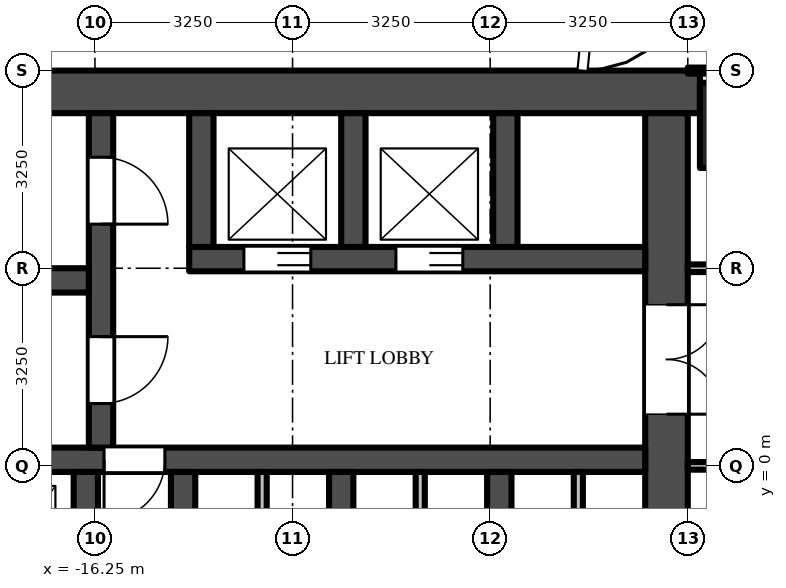
"""IFC4 building model, lengths in metres.
Left out: names, types, materials, properties, quantities, classifications, styles, units other than length and angle.
Written with IfcOpenShell. Run it as: python <this file> out.ifc"""

import sys

from ifc_helpers import new_model, si_unit, direction, frame, frame_2d, origin, origin_2d, place, context, subcontext, project, spatial, rectangle, extrude, source, transform, mapped, element, fill, save


model = new_model("IFC4")
c1 = context("Model", 3, precision=1e-05, world=origin(), true_north=direction((0.0, 1.0)))
c2 = subcontext(c1, "Body", "Model", "MODEL_VIEW")
j1 = project(units=[si_unit("LENGTHUNIT", "METRE"), si_unit("PLANEANGLEUNIT", "RADIAN")], contexts=[c1])
p1 = place(None, origin())
s1 = spatial("IfcSite", under=j1, at=p1, CompositionType="ELEMENT")
p2 = place(p1, origin())
s2 = spatial("IfcBuilding", under=s1, at=p2, CompositionType="ELEMENT")
p3 = place(p2, frame((0.0, 0.0, 83.5)))
s3 = spatial("IfcBuildingStorey", under=s2, at=p3, CompositionType="ELEMENT", Elevation=83.5)
m1 = source(origin(), c2, "Body", "SweptSolid", [
    extrude(rectangle(XDim=1.4, YDim=1.4, at=origin_2d()), origin(), (0.0, 0.0, 1.0), 4.5),
])
p4 = place(p3, frame((-5.6, 5.6, 0.0), z_axis=(0.0, 0.0, 1.0), x_axis=(1.0, 0.0, 0.0)))
e1 = element("IfcColumn", 1, at=p4, inside=s3, PredefinedType="COLUMN", context=c2, shape_type="MappedRepresentation", body=[
    mapped(m1, transform((0.0, 0.0, 0.0))),
])
m2 = source(origin(), c2, "Body", "SweptSolid", [
    extrude(rectangle(XDim=16.45, YDim=0.7, at=frame_2d((8.225, 0.0))), origin(), (0.0, 0.0, 1.0), 4.25),
])
p5 = place(p3, frame((-6.3, 6.15, 0.0), z_axis=(0.0, 0.0, 1.0), x_axis=(-1.0, 0.0, 0.0)))
e2 = element("IfcWall", 2, at=p5, inside=s3, PredefinedType="SHEAR", context=c2, shape_type="MappedRepresentation", body=[
    mapped(m2, transform((0.0, 0.0, 0.0))),
])
m3 = source(origin(), c2, "Body", "SweptSolid", [
    extrude(rectangle(XDim=9.05, YDim=0.7, at=frame_2d((4.525, 0.0))), origin(), (0.0, 0.0, 1.0), 4.25),
])
p6 = place(p3, frame((-6.85, 5.8, 0.0), z_axis=(0.0, 0.0, 1.0), x_axis=(0.0, -1.0, 0.0)))
e3 = element("IfcWall", 3, at=p6, inside=s3, PredefinedType="SHEAR", context=c2, shape_type="MappedRepresentation", body=[
    mapped(m3, transform((0.0, 0.0, 0.0))),
])
m4 = source(origin(), c2, "Body", "SweptSolid", [
    extrude(rectangle(XDim=1.8, YDim=2.1, at=frame_2d((0.9, 1.05))), frame((0.0, 0.36, 0.0), z_axis=(0.0, -1.0, 0.0), x_axis=(1.0, 0.0, 0.0)), (0.0, 0.0, 1.0), 0.72),
])
p7 = place(p6, frame((3.15, 0.0, 0.0)))
e4 = element("IfcOpeningElement", 4, at=p7, cuts=e3, PredefinedType="OPENING", context=c2, shape_type="MappedRepresentation", body=[
    mapped(m4, transform((0.0, 0.0, 0.0))),
])
m5 = source(origin(), c2, "Body", "SweptSolid", [
    extrude(rectangle(XDim=7.5, YDim=0.4, at=frame_2d((3.75, 0.0))), origin(), (0.0, 0.0, 1.0), 4.25),
])
p8 = place(p3, frame((-7.2, 3.4, 0.0), z_axis=(0.0, 0.0, 1.0), x_axis=(-1.0, 0.0, 0.0)))
e5 = element("IfcWall", 5, at=p8, inside=s3, PredefinedType="SHEAR", context=c2, shape_type="MappedRepresentation", body=[
    mapped(m5, transform((0.0, 0.0, 0.0))),
])
m6 = source(origin(), c2, "Body", "SweptSolid", [
    extrude(rectangle(XDim=1.1, YDim=2.1, at=frame_2d((0.55, 1.05))), frame((0.0, 0.21, 0.0), z_axis=(0.0, -1.0, 0.0), x_axis=(1.0, 0.0, 0.0)), (0.0, 0.0, 1.0), 0.42),
])
p9 = place(p8, frame((3.0, 0.0, 0.0)))
e6 = element("IfcOpeningElement", 6, at=p9, cuts=e5, PredefinedType="OPENING", context=c2, shape_type="MappedRepresentation", body=[
    mapped(m6, transform((0.0, 0.0, 0.0))),
])
p10 = place(p8, frame((5.5, 0.0, 0.0)))
e7 = element("IfcOpeningElement", 7, at=p10, cuts=e5, PredefinedType="OPENING", context=c2, shape_type="MappedRepresentation", body=[
    mapped(m6, transform((0.0, 0.0, 0.0))),
])
m7 = source(origin(), c2, "Body", "SweptSolid", [
    extrude(rectangle(XDim=14.85, YDim=0.4, at=frame_2d((7.425, 0.0))), origin(), (0.0, 0.0, 1.0), 4.25),
])
p11 = place(p3, frame((-7.2, 0.1, 0.0), z_axis=(0.0, 0.0, 1.0), x_axis=(-1.0, 0.0, 0.0)))
e8 = element("IfcWall", 8, at=p11, inside=s3, PredefinedType="SHEAR", context=c2, shape_type="MappedRepresentation", body=[
    mapped(m7, transform((0.0, 0.0, 0.0))),
])
m8 = source(origin(), c2, "Body", "SweptSolid", [
    extrude(rectangle(XDim=1.0, YDim=2.1, at=frame_2d((0.5, 1.05))), frame((0.0, 0.21, 0.0), z_axis=(0.0, -1.0, 0.0), x_axis=(1.0, 0.0, 0.0)), (0.0, 0.0, 1.0), 0.42),
])
p12 = place(p11, frame((7.9, 0.0, 0.0)))
e9 = element("IfcOpeningElement", 9, at=p12, cuts=e8, PredefinedType="OPENING", context=c2, shape_type="MappedRepresentation", body=[
    mapped(m8, transform((0.0, 0.0, 0.0))),
])
m9 = source(origin(), c2, "Body", "SweptSolid", [
    extrude(rectangle(XDim=5.5, YDim=0.4, at=frame_2d((2.75, 0.0))), origin(), (0.0, 0.0, 1.0), 4.25),
])
p13 = place(p3, frame((-16.15, 5.8, 0.0), z_axis=(0.0, 0.0, 1.0), x_axis=(0.0, -1.0, 0.0)))
e10 = element("IfcWall", 10, at=p13, inside=s3, PredefinedType="SHEAR", context=c2, shape_type="MappedRepresentation", body=[
    mapped(m9, transform((0.0, 0.0, 0.0))),
])
p14 = place(p13, frame((0.725, 0.0, 0.0)))
e11 = element("IfcOpeningElement", 11, at=p14, cuts=e10, PredefinedType="OPENING", context=c2, shape_type="MappedRepresentation", body=[
    mapped(m6, transform((0.0, 0.0, 0.0))),
])
p15 = place(p13, frame((3.675, 0.0, 0.0)))
e12 = element("IfcOpeningElement", 12, at=p15, cuts=e10, PredefinedType="OPENING", context=c2, shape_type="MappedRepresentation", body=[
    mapped(m6, transform((0.0, 0.0, 0.0))),
])
m10 = source(origin(), c2, "Body", "SweptSolid", [
    extrude(rectangle(XDim=5.7, YDim=0.4, at=frame_2d((2.85, 0.0))), origin(), (0.0, 0.0, 1.0), 4.25),
])
p16 = place(p3, frame((-16.35, 3.05, 0.0), z_axis=(0.0, 0.0, 1.0), x_axis=(-1.0, 0.0, 0.0)))
e13 = element("IfcWall", 13, at=p16, inside=s3, PredefinedType="SHEAR", context=c2, shape_type="MappedRepresentation", body=[
    mapped(m10, transform((0.0, 0.0, 0.0))),
])
m11 = source(origin(), c2, "Body", "SweptSolid", [
    extrude(rectangle(XDim=2.2, YDim=0.4, at=frame_2d((1.1, 0.0))), origin(), (0.0, 0.0, 1.0), 4.25),
])
for number, where, z_axis, x_axis in (
    (14, (-9.5, 5.8, 0.0), (0.0, 0.0, 1.0), (0.0, -1.0, 0.0)),
    (15, (-12.0, 5.8, 0.0), (0.0, 0.0, 1.0), (0.0, -1.0, 0.0)),
    (16, (-14.5, 5.8, 0.0), (0.0, 0.0, 1.0), (0.0, -1.0, 0.0)),
):
    element("IfcWall", number, at=place(p3, frame(where, z_axis=z_axis, x_axis=x_axis)), inside=s3, PredefinedType="SHEAR", context=c2, shape_type="MappedRepresentation", body=[
        mapped(m11, transform((0.0, 0.0, 0.0))),
    ])
m12 = source(origin(), c2, "Body", "SweptSolid", [
    extrude(rectangle(XDim=2.45, YDim=0.4, at=frame_2d((1.225, 0.0))), origin(), (0.0, 0.0, 1.0), 4.25),
])
for number, where, z_axis, x_axis in (
    (17, (-9.6, -0.1, 0.0), (0.0, 0.0, 1.0), (0.0, -1.0, 0.0)),
    (18, (-12.2, -0.1, 0.0), (0.0, 0.0, 1.0), (0.0, -1.0, 0.0)),
    (19, (-14.8, -0.1, 0.0), (0.0, 0.0, 1.0), (0.0, -1.0, 0.0)),
    (20, (-16.4, -0.1, 0.0), (0.0, 0.0, 1.0), (0.0, -1.0, 0.0)),
):
    element("IfcWall", number, at=place(p3, frame(where, z_axis=z_axis, x_axis=x_axis)), inside=s3, PredefinedType="SHEAR", context=c2, shape_type="MappedRepresentation", body=[
        mapped(m12, transform((0.0, 0.0, 0.0))),
    ])
m13 = source(origin(), c2, "Body", "SweptSolid", [
    extrude(rectangle(XDim=2.45, YDim=0.15, at=frame_2d((1.225, 0.0))), origin(), (0.0, 0.0, 1.0), 4.25),
])
for number, where, z_axis, x_axis in (
    (21, (-8.3, -0.1, 0.0), (0.0, 0.0, 1.0), (0.0, -1.0, 0.0)),
    (22, (-10.9, -0.1, 0.0), (0.0, 0.0, 1.0), (0.0, -1.0, 0.0)),
    (23, (-13.5, -0.1, 0.0), (0.0, 0.0, 1.0), (0.0, -1.0, 0.0)),
):
    element("IfcWall", number, at=place(p3, frame(where, z_axis=z_axis, x_axis=x_axis)), inside=s3, PredefinedType="PARTITIONING", context=c2, shape_type="MappedRepresentation", body=[
        mapped(m13, transform((0.0, 0.0, 0.0))),
    ])
m14 = source(origin(), c2, "Body", "SweptSolid", [
    extrude(rectangle(XDim=5.363, YDim=0.125, at=frame_2d((2.681, 0.0))), origin(), (0.0, 0.0, 1.0), 3.468),
])
p17 = place(p3, frame((-1.137, 0.0, 0.0), z_axis=(0.0, 0.0, 1.0), x_axis=(-1.0, 0.0, 0.0)))
e24 = element("IfcWall", 24, at=p17, inside=s3, PredefinedType="PARTITIONING", context=c2, shape_type="MappedRepresentation", body=[
    mapped(m14, transform((0.0, 0.0, 0.0))),
])
p18 = place(p3, frame((-6.5, 3.25, 0.0), z_axis=(0.0, 0.0, 1.0), x_axis=(1.0, 0.0, 0.0)))
e25 = element("IfcWall", 25, at=p18, inside=s3, PredefinedType="PARTITIONING", context=c2, shape_type="MappedRepresentation", body=[
    mapped(m14, transform((0.0, 0.0, 0.0))),
])
m15 = source(origin(), c2, "Body", "SweptSolid", [
    extrude(rectangle(XDim=1.0, YDim=2.1, at=frame_2d((0.5, 1.05))), frame((0.0, 0.073, 0.0), z_axis=(0.0, -1.0, 0.0), x_axis=(1.0, 0.0, 0.0)), (0.0, 0.0, 1.0), 0.145),
])
p19 = place(p18, frame((1.3, 0.0, 0.0)))
e26 = element("IfcOpeningElement", 26, at=p19, cuts=e25, PredefinedType="OPENING", context=c2, shape_type="MappedRepresentation", body=[
    mapped(m15, transform((0.0, 0.0, 0.0))),
])
m16 = source(origin(), c2, "Body", "SweptSolid", [
    extrude(rectangle(XDim=5.238, YDim=0.1, at=frame_2d((2.619, 0.0))), origin(), (0.0, 0.0, 1.0), 3.33),
])
p20 = place(p3, frame((-6.5, 6.5, 0.0), z_axis=(0.0, 0.0, 1.0), x_axis=(1.0, 0.0, 0.0)))
e27 = element("IfcWall", 27, at=p20, inside=s3, PredefinedType="PARTITIONING", context=c2, shape_type="MappedRepresentation", body=[
    mapped(m16, transform((0.0, 0.0, 0.0))),
])
m17 = source(origin(), c2, "Body", "SweptSolid", [
    extrude(rectangle(XDim=1.1, YDim=2.1, at=frame_2d((0.55, 1.05))), frame((0.0, 0.025, 0.0), z_axis=(0.0, -1.0, 0.0), x_axis=(1.0, 0.0, 0.0)), (0.0, 0.0, 1.0), 0.05),
])
p21 = place(p9, origin())
e28 = element("IfcDoor", 28, at=p21, inside=s3, OperationType="DOUBLE_DOOR_SLIDING", PredefinedType="DOOR", context=c2, shape_type="MappedRepresentation", body=[
    mapped(m17, transform((0.0, 0.0, 0.0))),
])
fill(e6, e28)
p22 = place(p10, origin())
e29 = element("IfcDoor", 29, at=p22, inside=s3, OperationType="DOUBLE_DOOR_SLIDING", PredefinedType="DOOR", context=c2, shape_type="MappedRepresentation", body=[
    mapped(m17, transform((0.0, 0.0, 0.0))),
])
fill(e7, e29)
m18 = source(origin(), c2, "Body", "SweptSolid", [
    extrude(rectangle(XDim=1.8, YDim=2.1, at=frame_2d((0.9, 1.05))), frame((0.0, -0.275, 0.0), z_axis=(0.0, -1.0, 0.0), x_axis=(1.0, 0.0, 0.0)), (0.0, 0.0, 1.0), 0.05),
])
p23 = place(p7, origin())
e30 = element("IfcDoor", 30, at=p23, inside=s3, OperationType="DOUBLE_DOOR_SINGLE_SWING", PredefinedType="DOOR", context=c2, shape_type="MappedRepresentation", body=[
    mapped(m18, transform((0.0, 0.0, 0.0))),
])
fill(e4, e30)
p24 = place(p14, origin())
e31 = element("IfcDoor", 31, at=p24, inside=s3, OperationType="SINGLE_SWING_RIGHT", PredefinedType="DOOR", context=c2, shape_type="MappedRepresentation", body=[
    mapped(m17, transform((0.0, 0.0, 0.0))),
])
fill(e11, e31)
p25 = place(p15, origin())
e32 = element("IfcDoor", 32, at=p25, inside=s3, OperationType="SINGLE_SWING_LEFT", PredefinedType="DOOR", context=c2, shape_type="MappedRepresentation", body=[
    mapped(m17, transform((0.0, 0.0, 0.0))),
])
fill(e12, e32)
m19 = source(origin(), c2, "Body", "SweptSolid", [
    extrude(rectangle(XDim=1.0, YDim=2.1, at=frame_2d((0.5, 1.05))), frame((0.0, 0.025, 0.0), z_axis=(0.0, -1.0, 0.0), x_axis=(1.0, 0.0, 0.0)), (0.0, 0.0, 1.0), 0.05),
])
p26 = place(p12, origin())
e33 = element("IfcDoor", 33, at=p26, inside=s3, OperationType="SINGLE_SWING_RIGHT", PredefinedType="DOOR", context=c2, shape_type="MappedRepresentation", body=[
    mapped(m19, transform((0.0, 0.0, 0.0))),
])
fill(e9, e33)
save(model, sys.argv[1])
